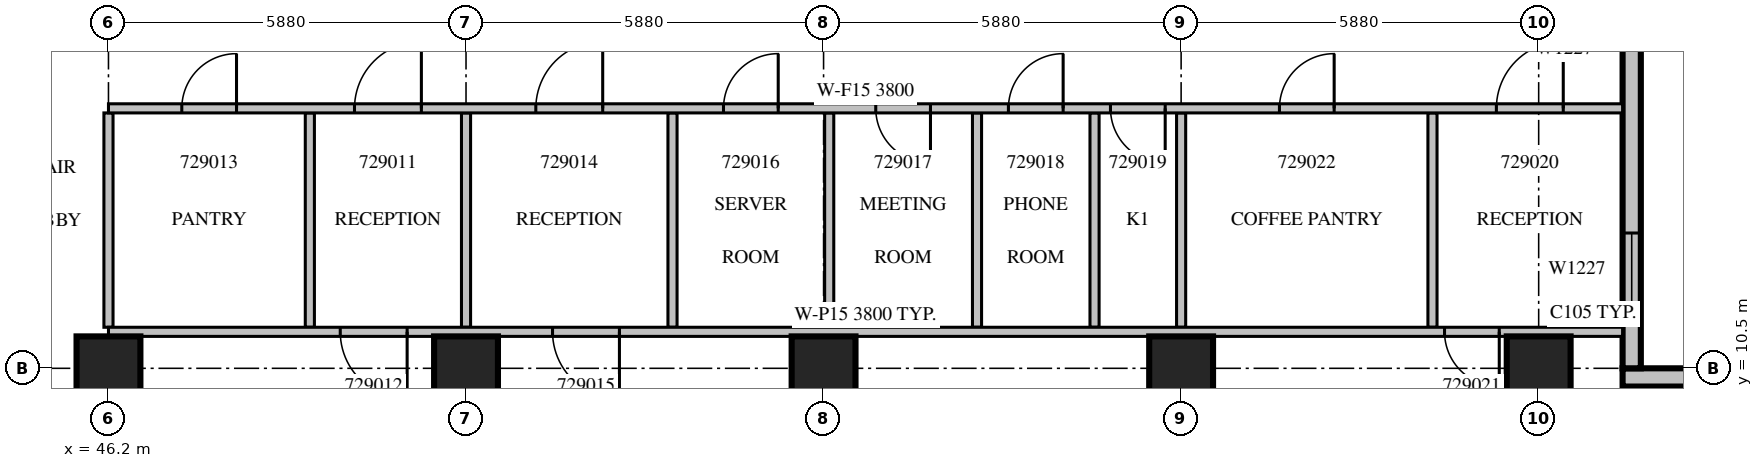
"""IFC4 building model, lengths in metres.
Left out: names, types, materials, properties, quantities, classifications, styles, units other than length and angle.
Written with IfcOpenShell. Run it as: python <this file> out.ifc"""

import sys

from ifc_helpers import new_model, si_unit, direction, frame, frame_2d, origin, origin_2d, place, context, subcontext, project, spatial, rectangle, extrude, source, transform, mapped, element, fill, save


model = new_model("IFC4")
c1 = context("Model", 3, precision=1e-05, world=origin(), true_north=direction((0.0, 1.0)))
c2 = subcontext(c1, "Body", "Model", "MODEL_VIEW")
j1 = project(units=[si_unit("LENGTHUNIT", "METRE"), si_unit("PLANEANGLEUNIT", "RADIAN")], contexts=[c1])
p1 = place(None, origin())
s1 = spatial("IfcSite", under=j1, at=p1, CompositionType="ELEMENT")
p2 = place(p1, origin())
s2 = spatial("IfcBuilding", under=s1, at=p2, CompositionType="ELEMENT")
p3 = place(p2, frame((0.0, 0.0, 132.9)))
s3 = spatial("IfcBuildingStorey", under=s2, at=p3, CompositionType="ELEMENT", Elevation=132.9)
m1 = source(origin(), c2, "Body", "SweptSolid", [
    extrude(rectangle(XDim=1.05, YDim=1.05, at=origin_2d()), origin(), (0.0, 0.0, 1.0), 4.2),
])
for number, where, z_axis, x_axis in (
    (1, (46.2, 10.5, 0.0), (0.0, 0.0, 1.0), (1.0, 0.0, 0.0)),
    (2, (52.08, 10.5, 0.0), (0.0, 0.0, 1.0), (1.0, 0.0, 0.0)),
    (3, (57.96, 10.5, 0.0), (0.0, 0.0, 1.0), (1.0, 0.0, 0.0)),
    (4, (63.84, 10.5, 0.0), (0.0, 0.0, 1.0), (1.0, 0.0, 0.0)),
    (5, (69.72, 10.5, 0.0), (0.0, 0.0, 1.0), (1.0, 0.0, 0.0)),
):
    element("IfcColumn", number, at=place(p3, frame(where, z_axis=z_axis, x_axis=x_axis)), inside=s3, PredefinedType="COLUMN", context=c2, shape_type="MappedRepresentation", body=[
        mapped(m1, transform((0.0, 0.0, 0.0), scale=1.0)),
    ])
m2 = source(origin(), c2, "Body", "SweptSolid", [
    extrude(rectangle(XDim=1.2, YDim=0.3, at=frame_2d((0.6, 0.0))), origin(), (0.0, 0.0, 1.0), 3.8),
])
p4 = place(p3, frame((71.1, 10.35, 0.0), z_axis=(0.0, 0.0, 1.0), x_axis=(1.0, 0.0, 0.0)))
e6 = element("IfcWall", 6, at=p4, inside=s3, PredefinedType="STANDARD", context=c2, shape_type="MappedRepresentation", body=[
    mapped(m2, transform((0.0, 0.0, 0.0), scale=1.0)),
])
m3 = source(origin(), c2, "Body", "SweptSolid", [
    extrude(rectangle(XDim=6.3, YDim=0.3, at=frame_2d((3.15, 0.0))), origin(), (0.0, 0.0, 1.0), 3.8),
])
p5 = place(p3, frame((71.25, 10.5, 0.0), z_axis=(0.0, 0.0, 1.0), x_axis=(0.0, 1.0, 0.0)))
e7 = element("IfcWall", 7, at=p5, inside=s3, PredefinedType="STANDARD", context=c2, shape_type="MappedRepresentation", body=[
    mapped(m3, transform((0.0, 0.0, 0.0), scale=1.0)),
])
m4 = source(origin(), c2, "Body", "SweptSolid", [
    extrude(rectangle(XDim=1.2, YDim=2.7, at=frame_2d((0.6, 1.35))), frame((0.0, 0.16, 0.0), z_axis=(0.0, -1.0, 0.0), x_axis=(1.0, 0.0, 0.0)), (0.0, 0.0, 1.0), 0.32),
])
p6 = place(p5, frame((1.025, 0.0, 0.6)))
e8 = element("IfcOpeningElement", 8, at=p6, cuts=e7, PredefinedType="OPENING", context=c2, shape_type="MappedRepresentation", body=[
    mapped(m4, transform((0.0, 0.0, 0.0), scale=1.0)),
])
m5 = source(origin(), c2, "Body", "SweptSolid", [
    extrude(rectangle(XDim=3.525, YDim=0.15, at=frame_2d((1.762, 0.0))), origin(), (0.0, 0.0, 1.0), 3.8),
])
for number, where, z_axis, x_axis in (
    (9, (49.512, 11.175, 0.0), (0.0, 0.0, 1.0), (0.0, 1.0, 0.0)),
    (10, (55.476, 11.175, 0.0), (0.0, 0.0, 1.0), (0.0, 1.0, 0.0)),
    (11, (58.053, 11.175, 0.0), (0.0, 0.0, 1.0), (0.0, 1.0, 0.0)),
    (12, (60.483, 11.175, 0.0), (0.0, 0.0, 1.0), (0.0, 1.0, 0.0)),
    (13, (62.416, 11.175, 0.0), (0.0, 0.0, 1.0), (0.0, 1.0, 0.0)),
    (14, (67.974, 11.175, 0.0), (0.0, 0.0, 1.0), (0.0, 1.0, 0.0)),
    (15, (46.2, 11.175, 0.0), (0.0, 0.0, 1.0), (0.0, 1.0, 0.0)),
    (16, (52.08, 11.175, 0.0), (0.0, 0.0, 1.0), (0.0, 1.0, 0.0)),
    (17, (63.84, 11.175, 0.0), (0.0, 0.0, 1.0), (0.0, 1.0, 0.0)),
):
    element("IfcWall", number, at=place(p3, frame(where, z_axis=z_axis, x_axis=x_axis)), inside=s3, PredefinedType="PARTITIONING", context=c2, shape_type="MappedRepresentation", body=[
        mapped(m5, transform((0.0, 0.0, 0.0), scale=1.0)),
    ])
m6 = source(origin(), c2, "Body", "SweptSolid", [
    extrude(rectangle(XDim=24.9, YDim=0.15, at=frame_2d((12.45, 0.0))), origin(), (0.0, 0.0, 1.0), 3.8),
])
p7 = place(p3, frame((71.1, 11.1, 0.0), z_axis=(0.0, 0.0, 1.0), x_axis=(-1.0, 0.0, 0.0)))
e18 = element("IfcWall", 18, at=p7, inside=s3, PredefinedType="PARTITIONING", context=c2, shape_type="MappedRepresentation", body=[
    mapped(m6, transform((0.0, 0.0, 0.0), scale=1.0)),
])
m7 = source(origin(), c2, "Body", "SweptSolid", [
    extrude(rectangle(XDim=1.1, YDim=2.1, at=frame_2d((0.55, 1.05))), frame((0.0, 0.085, 0.0), z_axis=(0.0, -1.0, 0.0), x_axis=(1.0, 0.0, 0.0)), (0.0, 0.0, 1.0), 0.17),
])
p8 = place(p7, frame((19.988, 0.0, 0.0)))
e19 = element("IfcOpeningElement", 19, at=p8, cuts=e18, PredefinedType="OPENING", context=c2, shape_type="MappedRepresentation", body=[
    mapped(m7, transform((0.0, 0.0, 0.0), scale=1.0)),
])
p9 = place(p7, frame((16.497, 0.0, 0.0)))
e20 = element("IfcOpeningElement", 20, at=p9, cuts=e18, PredefinedType="OPENING", context=c2, shape_type="MappedRepresentation", body=[
    mapped(m7, transform((0.0, 0.0, 0.0), scale=1.0)),
])
m8 = source(origin(), c2, "Body", "SweptSolid", [
    extrude(rectangle(XDim=0.9, YDim=2.1, at=frame_2d((0.45, 1.05))), frame((0.0, 0.085, 0.0), z_axis=(0.0, -1.0, 0.0), x_axis=(1.0, 0.0, 0.0)), (0.0, 0.0, 1.0), 0.17),
])
p10 = place(p7, frame((2.028, 0.0, 0.0)))
e21 = element("IfcOpeningElement", 21, at=p10, cuts=e18, PredefinedType="OPENING", context=c2, shape_type="MappedRepresentation", body=[
    mapped(m8, transform((0.0, 0.0, 0.0), scale=1.0)),
])
p11 = place(p3, frame((71.1, 14.775, 0.0), z_axis=(0.0, 0.0, 1.0), x_axis=(-1.0, 0.0, 0.0)))
e22 = element("IfcWall", 22, at=p11, inside=s3, PredefinedType="PARTITIONING", context=c2, shape_type="MappedRepresentation", body=[
    mapped(m6, transform((0.0, 0.0, 0.0), scale=1.0)),
])
p12 = place(p11, frame((19.754, 0.0, 0.0)))
e23 = element("IfcOpeningElement", 23, at=p12, cuts=e22, PredefinedType="OPENING", context=c2, shape_type="MappedRepresentation", body=[
    mapped(m7, transform((0.0, 0.0, 0.0), scale=1.0)),
])
p13 = place(p11, frame((22.794, 0.0, 0.0)))
e24 = element("IfcOpeningElement", 24, at=p13, cuts=e22, PredefinedType="OPENING", context=c2, shape_type="MappedRepresentation", body=[
    mapped(m8, transform((0.0, 0.0, 0.0), scale=1.0)),
])
p14 = place(p11, frame((16.772, 0.0, 0.0)))
e25 = element("IfcOpeningElement", 25, at=p14, cuts=e22, PredefinedType="OPENING", context=c2, shape_type="MappedRepresentation", body=[
    mapped(m7, transform((0.0, 0.0, 0.0), scale=1.0)),
])
p15 = place(p11, frame((13.886, 0.0, 0.0)))
e26 = element("IfcOpeningElement", 26, at=p15, cuts=e22, PredefinedType="OPENING", context=c2, shape_type="MappedRepresentation", body=[
    mapped(m8, transform((0.0, 0.0, 0.0), scale=1.0)),
])
p16 = place(p11, frame((11.382, 0.0, 0.0)))
e27 = element("IfcOpeningElement", 27, at=p16, cuts=e22, PredefinedType="OPENING", context=c2, shape_type="MappedRepresentation", body=[
    mapped(m8, transform((0.0, 0.0, 0.0), scale=1.0)),
])
p17 = place(p11, frame((9.2, 0.0, 0.0)))
e28 = element("IfcOpeningElement", 28, at=p17, cuts=e22, PredefinedType="OPENING", context=c2, shape_type="MappedRepresentation", body=[
    mapped(m8, transform((0.0, 0.0, 0.0), scale=1.0)),
])
p18 = place(p11, frame((7.522, 0.0, 0.0)))
e29 = element("IfcOpeningElement", 29, at=p18, cuts=e22, PredefinedType="OPENING", context=c2, shape_type="MappedRepresentation", body=[
    mapped(m8, transform((0.0, 0.0, 0.0), scale=1.0)),
])
p19 = place(p11, frame((0.976, 0.0, 0.0)))
e30 = element("IfcOpeningElement", 30, at=p19, cuts=e22, PredefinedType="OPENING", context=c2, shape_type="MappedRepresentation", body=[
    mapped(m7, transform((0.0, 0.0, 0.0), scale=1.0)),
])
p20 = place(p11, frame((4.743, 0.0, 0.0)))
e31 = element("IfcOpeningElement", 31, at=p20, cuts=e22, PredefinedType="OPENING", context=c2, shape_type="MappedRepresentation", body=[
    mapped(m8, transform((0.0, 0.0, 0.0), scale=1.0)),
])
m9 = source(origin(), c2, "Body", "SweptSolid", [
    extrude(rectangle(XDim=1.2, YDim=2.7, at=frame_2d((0.6, 1.35))), frame((0.0, 0.03, 0.0), z_axis=(0.0, -1.0, 0.0), x_axis=(1.0, 0.0, 0.0)), (0.0, 0.0, 1.0), 0.06),
])
p21 = place(p6, origin())
e32 = element("IfcWindow", 32, at=p21, inside=s3, PartitioningType="SINGLE_PANEL", PredefinedType="WINDOW", context=c2, shape_type="MappedRepresentation", body=[
    mapped(m9, transform((0.0, 0.0, 0.0), scale=1.0)),
])
fill(e8, e32)
m10 = source(origin(), c2, "Body", "SweptSolid", [
    extrude(rectangle(XDim=1.1, YDim=2.1, at=frame_2d((0.55, 1.05))), frame((0.0, 0.025, 0.0), z_axis=(0.0, -1.0, 0.0), x_axis=(1.0, 0.0, 0.0)), (0.0, 0.0, 1.0), 0.05),
])
p22 = place(p12, origin())
e33 = element("IfcDoor", 33, at=p22, inside=s3, OperationType="SINGLE_SWING_RIGHT", PredefinedType="DOOR", context=c2, shape_type="MappedRepresentation", body=[
    mapped(m10, transform((0.0, 0.0, 0.0), scale=1.0)),
])
fill(e23, e33)
p23 = place(p8, origin())
e34 = element("IfcDoor", 34, at=p23, inside=s3, OperationType="SINGLE_SWING_LEFT", PredefinedType="DOOR", context=c2, shape_type="MappedRepresentation", body=[
    mapped(m10, transform((0.0, 0.0, 0.0), scale=1.0)),
])
fill(e19, e34)
m11 = source(origin(), c2, "Body", "SweptSolid", [
    extrude(rectangle(XDim=0.9, YDim=2.1, at=frame_2d((0.45, 1.05))), frame((0.0, 0.025, 0.0), z_axis=(0.0, -1.0, 0.0), x_axis=(1.0, 0.0, 0.0)), (0.0, 0.0, 1.0), 0.05),
])
p24 = place(p13, origin())
e35 = element("IfcDoor", 35, at=p24, inside=s3, OperationType="SINGLE_SWING_RIGHT", PredefinedType="DOOR", context=c2, shape_type="MappedRepresentation", body=[
    mapped(m11, transform((0.0, 0.0, 0.0), scale=1.0)),
])
fill(e24, e35)
p25 = place(p14, origin())
e36 = element("IfcDoor", 36, at=p25, inside=s3, OperationType="SINGLE_SWING_RIGHT", PredefinedType="DOOR", context=c2, shape_type="MappedRepresentation", body=[
    mapped(m10, transform((0.0, 0.0, 0.0), scale=1.0)),
])
fill(e25, e36)
p26 = place(p9, origin())
e37 = element("IfcDoor", 37, at=p26, inside=s3, OperationType="SINGLE_SWING_LEFT", PredefinedType="DOOR", context=c2, shape_type="MappedRepresentation", body=[
    mapped(m10, transform((0.0, 0.0, 0.0), scale=1.0)),
])
fill(e20, e37)
p27 = place(p15, origin())
e38 = element("IfcDoor", 38, at=p27, inside=s3, OperationType="SINGLE_SWING_RIGHT", PredefinedType="DOOR", context=c2, shape_type="MappedRepresentation", body=[
    mapped(m11, transform((0.0, 0.0, 0.0), scale=1.0)),
])
fill(e26, e38)
p28 = place(p16, origin())
e39 = element("IfcDoor", 39, at=p28, inside=s3, OperationType="SINGLE_SWING_LEFT", PredefinedType="DOOR", context=c2, shape_type="MappedRepresentation", body=[
    mapped(m11, transform((0.0, 0.0, 0.0), scale=1.0)),
])
fill(e27, e39)
p29 = place(p17, origin())
e40 = element("IfcDoor", 40, at=p29, inside=s3, OperationType="SINGLE_SWING_RIGHT", PredefinedType="DOOR", context=c2, shape_type="MappedRepresentation", body=[
    mapped(m11, transform((0.0, 0.0, 0.0), scale=1.0)),
])
fill(e28, e40)
p30 = place(p18, origin())
e41 = element("IfcDoor", 41, at=p30, inside=s3, OperationType="SINGLE_SWING_LEFT", PredefinedType="DOOR", context=c2, shape_type="MappedRepresentation", body=[
    mapped(m11, transform((0.0, 0.0, 0.0), scale=1.0)),
])
fill(e29, e41)
p31 = place(p19, origin())
e42 = element("IfcDoor", 42, at=p31, inside=s3, OperationType="SINGLE_SWING_RIGHT", PredefinedType="DOOR", context=c2, shape_type="MappedRepresentation", body=[
    mapped(m10, transform((0.0, 0.0, 0.0), scale=1.0)),
])
fill(e30, e42)
p32 = place(p10, origin())
e43 = element("IfcDoor", 43, at=p32, inside=s3, OperationType="SINGLE_SWING_LEFT", PredefinedType="DOOR", context=c2, shape_type="MappedRepresentation", body=[
    mapped(m11, transform((0.0, 0.0, 0.0), scale=1.0)),
])
fill(e21, e43)
p33 = place(p20, origin())
e44 = element("IfcDoor", 44, at=p33, inside=s3, OperationType="SINGLE_SWING_RIGHT", PredefinedType="DOOR", context=c2, shape_type="MappedRepresentation", body=[
    mapped(m11, transform((0.0, 0.0, 0.0), scale=1.0)),
])
fill(e31, e44)
save(model, sys.argv[1])
